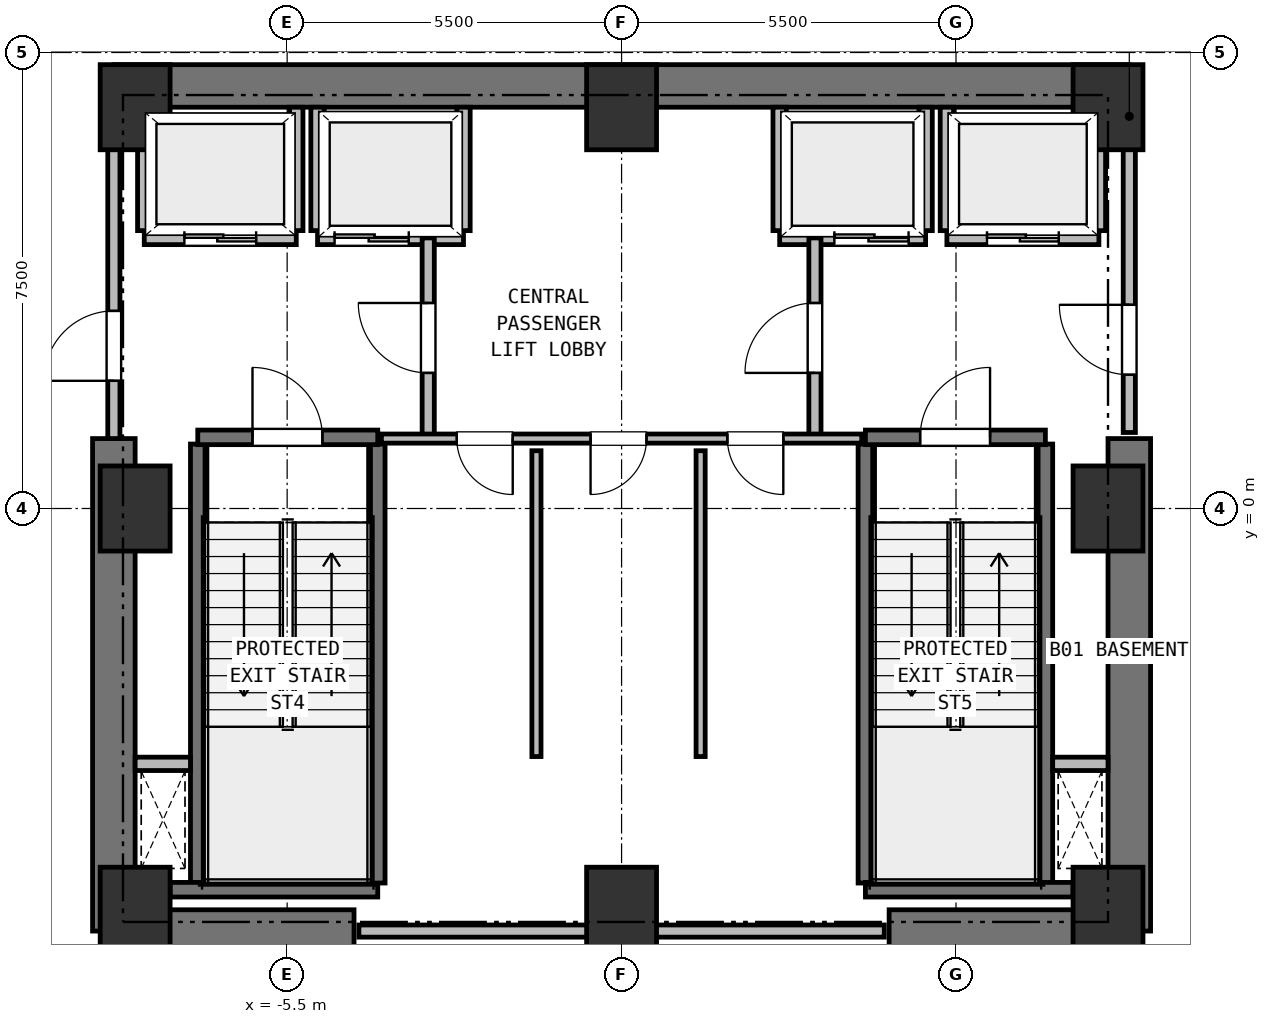
"""IFC4 building model, lengths in metres.
Left out: names, types, materials, properties, quantities, classifications, styles, units other than length and angle.
Written with IfcOpenShell. Run it as: python <this file> out.ifc"""

import sys

from ifc_helpers import new_model, si_unit, direction, frame, frame_2d, origin, origin_2d, place, context, subcontext, project, spatial, rectangle, extrude, element, fill, save


model = new_model("IFC4")
c1 = context("Model", 3, precision=1e-05, world=origin(), true_north=direction((0.0, 1.0)))
c2 = subcontext(c1, "Body", "Model", "MODEL_VIEW")
j1 = project(units=[si_unit("LENGTHUNIT", "METRE"), si_unit("PLANEANGLEUNIT", "RADIAN")], contexts=[c1])
p1 = place(None, origin())
s1 = spatial("IfcSite", under=j1, at=p1, CompositionType="ELEMENT")
p2 = place(p1, origin())
s2 = spatial("IfcBuilding", under=s1, at=p2, CompositionType="ELEMENT")
p3 = place(p2, frame((0.0, 0.0, -4.5)))
s3 = spatial("IfcBuildingStorey", under=s2, at=p3, CompositionType="ELEMENT", Elevation=-4.5)
for number, where, z_axis, x_axis in (
    (1, (-8.0, -6.6, 0.0), (0.0, 0.0, 1.0), (1.0, 0.0, 0.0)),
    (2, (0.0, -6.6, 0.0), (0.0, 0.0, 1.0), (1.0, 0.0, 0.0)),
    (3, (8.0, -6.6, 0.0), (0.0, 0.0, 1.0), (1.0, 0.0, 0.0)),
    (4, (8.0, 0.0, 0.0), (0.0, 0.0, 1.0), (1.0, 0.0, 0.0)),
    (5, (8.0, 6.6, 0.0), (0.0, 0.0, 1.0), (1.0, 0.0, 0.0)),
    (6, (0.0, 6.6, 0.0), (0.0, 0.0, 1.0), (1.0, 0.0, 0.0)),
    (7, (-8.0, 6.6, 0.0), (0.0, 0.0, 1.0), (1.0, 0.0, 0.0)),
    (8, (-8.0, 0.0, 0.0), (0.0, 0.0, 1.0), (1.0, 0.0, 0.0)),
):
    element("IfcColumn", number, at=place(p3, frame(where, z_axis=z_axis, x_axis=x_axis)), inside=s3, PredefinedType="COLUMN", context=c2, shape_type="SweptSolid", body=[
        extrude(rectangle(XDim=1.15, YDim=1.4, at=origin_2d()), origin(), (0.0, 0.0, 1.0), 4.5),
    ])
p4 = place(p3, frame((-8.35, 6.95, 0.0), z_axis=(0.0, 0.0, 1.0), x_axis=(1.0, 0.0, 0.0)))
e9 = element("IfcWall", 9, at=p4, inside=s3, PredefinedType="SHEAR", context=c2, shape_type="SweptSolid", body=[
    extrude(rectangle(XDim=16.7, YDim=0.7, at=frame_2d((8.35, 0.0))), origin(), (0.0, 0.0, 1.0), 4.22),
])
for number, where, z_axis, x_axis in (
    (10, (-8.35, -6.95, 0.0), (0.0, 0.0, 1.0), (1.0, 0.0, 0.0)),
    (11, (4.4, -6.95, 0.0), (0.0, 0.0, 1.0), (1.0, 0.0, 0.0)),
):
    element("IfcWall", number, at=place(p3, frame(where, z_axis=z_axis, x_axis=x_axis)), inside=s3, PredefinedType="SHEAR", context=c2, shape_type="SweptSolid", body=[
        extrude(rectangle(XDim=3.95, YDim=0.7, at=frame_2d((1.975, 0.0))), origin(), (0.0, 0.0, 1.0), 4.22),
    ])
for number, where, z_axis, x_axis in (
    (12, (-8.35, -6.95, 0.0), (0.0, 0.0, 1.0), (0.0, 1.0, 0.0)),
    (13, (8.35, -6.95, 0.0), (0.0, 0.0, 1.0), (0.0, 1.0, 0.0)),
):
    element("IfcWall", number, at=place(p3, frame(where, z_axis=z_axis, x_axis=x_axis)), inside=s3, PredefinedType="SHEAR", context=c2, shape_type="SweptSolid", body=[
        extrude(rectangle(XDim=8.1, YDim=0.7, at=frame_2d((4.05, 0.0))), origin(), (0.0, 0.0, 1.0), 4.22),
    ])
p5 = place(p3, frame((-6.97, -6.16, 0.0), z_axis=(0.0, 0.0, 1.0), x_axis=(0.0, 1.0, 0.0)))
e14 = element("IfcWall", 14, at=p5, inside=s3, PredefinedType="SHEAR", context=c2, shape_type="SweptSolid", body=[
    extrude(rectangle(XDim=7.22, YDim=0.24, at=frame_2d((3.61, 0.0))), origin(), (0.0, 0.0, 1.0), 4.22),
])
p6 = place(p3, frame((-7.425, -6.27, 0.0), z_axis=(0.0, 0.0, 1.0), x_axis=(1.0, 0.0, 0.0)))
e15 = element("IfcWall", 15, at=p6, inside=s3, PredefinedType="SHEAR", context=c2, shape_type="SweptSolid", body=[
    extrude(rectangle(XDim=3.415, YDim=0.24, at=frame_2d((1.708, 0.0))), origin(), (0.0, 0.0, 1.0), 4.22),
])
p7 = place(p3, frame((-4.01, -6.16, 0.0), z_axis=(0.0, 0.0, 1.0), x_axis=(0.0, 1.0, 0.0)))
e16 = element("IfcWall", 16, at=p7, inside=s3, PredefinedType="SHEAR", context=c2, shape_type="SweptSolid", body=[
    extrude(rectangle(XDim=7.22, YDim=0.24, at=frame_2d((3.61, 0.0))), origin(), (0.0, 0.0, 1.0), 4.22),
])
p8 = place(p3, frame((-6.97, 1.17, 0.0), z_axis=(0.0, 0.0, 1.0), x_axis=(1.0, 0.0, 0.0)))
e17 = element("IfcWall", 17, at=p8, inside=s3, PredefinedType="SHEAR", context=c2, shape_type="SweptSolid", body=[
    extrude(rectangle(XDim=2.96, YDim=0.24, at=frame_2d((1.48, 0.0))), origin(), (0.0, 0.0, 1.0), 4.22),
])
p9 = place(p8, frame((0.9, 0.0, 0.0)))
e18 = element("IfcOpeningElement", 18, at=p9, cuts=e17, PredefinedType="OPENING", context=c2, shape_type="SweptSolid", body=[
    extrude(rectangle(XDim=1.15, YDim=2.15, at=frame_2d((0.575, 1.075))), frame((0.0, 0.13, 0.0), z_axis=(0.0, -1.0, 0.0), x_axis=(1.0, 0.0, 0.0)), (0.0, 0.0, 1.0), 0.26),
])
for number, where, z_axis, x_axis in (
    (19, (4.01, -6.16, 0.0), (0.0, 0.0, 1.0), (0.0, 1.0, 0.0)),
    (20, (6.97, -6.16, 0.0), (0.0, 0.0, 1.0), (0.0, 1.0, 0.0)),
):
    element("IfcWall", number, at=place(p3, frame(where, z_axis=z_axis, x_axis=x_axis)), inside=s3, PredefinedType="SHEAR", context=c2, shape_type="SweptSolid", body=[
        extrude(rectangle(XDim=7.22, YDim=0.24, at=frame_2d((3.61, 0.0))), origin(), (0.0, 0.0, 1.0), 4.22),
    ])
p10 = place(p3, frame((4.01, -6.27, 0.0), z_axis=(0.0, 0.0, 1.0), x_axis=(1.0, 0.0, 0.0)))
e21 = element("IfcWall", 21, at=p10, inside=s3, PredefinedType="SHEAR", context=c2, shape_type="SweptSolid", body=[
    extrude(rectangle(XDim=3.415, YDim=0.24, at=frame_2d((1.708, 0.0))), origin(), (0.0, 0.0, 1.0), 4.22),
])
p11 = place(p3, frame((4.01, 1.17, 0.0), z_axis=(0.0, 0.0, 1.0), x_axis=(1.0, 0.0, 0.0)))
e22 = element("IfcWall", 22, at=p11, inside=s3, PredefinedType="SHEAR", context=c2, shape_type="SweptSolid", body=[
    extrude(rectangle(XDim=2.96, YDim=0.24, at=frame_2d((1.48, 0.0))), origin(), (0.0, 0.0, 1.0), 4.22),
])
p12 = place(p11, frame((0.9, 0.0, 0.0)))
e23 = element("IfcOpeningElement", 23, at=p12, cuts=e22, PredefinedType="OPENING", context=c2, shape_type="SweptSolid", body=[
    extrude(rectangle(XDim=1.15, YDim=2.15, at=frame_2d((0.575, 1.075))), frame((0.0, 0.13, 0.0), z_axis=(0.0, -1.0, 0.0), x_axis=(1.0, 0.0, 0.0)), (0.0, 0.0, 1.0), 0.26),
])
for number, where, z_axis, x_axis in (
    (24, (-8.0, -4.2, 0.0), (0.0, 0.0, 1.0), (1.0, 0.0, 0.0)),
    (25, (7.09, -4.2, 0.0), (0.0, 0.0, 1.0), (1.0, 0.0, 0.0)),
):
    element("IfcWall", number, at=place(p3, frame(where, z_axis=z_axis, x_axis=x_axis)), inside=s3, PredefinedType="PARTITIONING", context=c2, shape_type="SweptSolid", body=[
        extrude(rectangle(XDim=0.91, YDim=0.22, at=frame_2d((0.455, 0.0))), origin(), (0.0, 0.0, 1.0), 4.22),
    ])
p13 = place(p3, frame((-7.85, 4.45, 0.0), z_axis=(0.0, 0.0, 1.0), x_axis=(1.0, 0.0, 0.0)))
e26 = element("IfcWall", 26, at=p13, inside=s3, PredefinedType="PARTITIONING", context=c2, shape_type="SweptSolid", body=[
    extrude(rectangle(XDim=2.5, YDim=0.22, at=frame_2d((1.25, 0.0))), origin(), (0.0, 0.0, 1.0), 4.22),
])
p14 = place(p13, frame((0.66, 0.0, 0.0)))
e27 = element("IfcOpeningElement", 27, at=p14, cuts=e26, PredefinedType="OPENING", context=c2, shape_type="SweptSolid", body=[
    extrude(rectangle(XDim=1.18, YDim=2.15, at=frame_2d((0.59, 1.075))), frame((0.0, 0.12, 0.0), z_axis=(0.0, -1.0, 0.0), x_axis=(1.0, 0.0, 0.0)), (0.0, 0.0, 1.0), 0.24),
])
p15 = place(p3, frame((-7.85, 4.57, 0.0), z_axis=(0.0, 0.0, 1.0), x_axis=(0.0, 1.0, 0.0)))
e28 = element("IfcWall", 28, at=p15, inside=s3, PredefinedType="PARTITIONING", context=c2, shape_type="SweptSolid", body=[
    extrude(rectangle(XDim=2.03, YDim=0.22, at=frame_2d((1.015, 0.0))), origin(), (0.0, 0.0, 1.0), 3.8),
])
p16 = place(p3, frame((-5.35, 4.57, 0.0), z_axis=(0.0, 0.0, 1.0), x_axis=(0.0, 1.0, 0.0)))
e29 = element("IfcWall", 29, at=p16, inside=s3, PredefinedType="PARTITIONING", context=c2, shape_type="SweptSolid", body=[
    extrude(rectangle(XDim=2.03, YDim=0.22, at=frame_2d((1.015, 0.0))), origin(), (0.0, 0.0, 1.0), 4.22),
])
p17 = place(p3, frame((5.35, 4.45, 0.0), z_axis=(0.0, 0.0, 1.0), x_axis=(1.0, 0.0, 0.0)))
e30 = element("IfcWall", 30, at=p17, inside=s3, PredefinedType="PARTITIONING", context=c2, shape_type="SweptSolid", body=[
    extrude(rectangle(XDim=2.5, YDim=0.22, at=frame_2d((1.25, 0.0))), origin(), (0.0, 0.0, 1.0), 4.22),
])
p18 = place(p17, frame((0.66, 0.0, 0.0)))
e31 = element("IfcOpeningElement", 31, at=p18, cuts=e30, PredefinedType="OPENING", context=c2, shape_type="SweptSolid", body=[
    extrude(rectangle(XDim=1.18, YDim=2.15, at=frame_2d((0.59, 1.075))), frame((0.0, 0.12, 0.0), z_axis=(0.0, -1.0, 0.0), x_axis=(1.0, 0.0, 0.0)), (0.0, 0.0, 1.0), 0.24),
])
p19 = place(p3, frame((5.35, 4.57, 0.0), z_axis=(0.0, 0.0, 1.0), x_axis=(0.0, 1.0, 0.0)))
e32 = element("IfcWall", 32, at=p19, inside=s3, PredefinedType="PARTITIONING", context=c2, shape_type="SweptSolid", body=[
    extrude(rectangle(XDim=2.03, YDim=0.22, at=frame_2d((1.015, 0.0))), origin(), (0.0, 0.0, 1.0), 4.22),
])
p20 = place(p3, frame((7.85, 4.57, 0.0), z_axis=(0.0, 0.0, 1.0), x_axis=(0.0, 1.0, 0.0)))
e33 = element("IfcWall", 33, at=p20, inside=s3, PredefinedType="PARTITIONING", context=c2, shape_type="SweptSolid", body=[
    extrude(rectangle(XDim=2.03, YDim=0.22, at=frame_2d((1.015, 0.0))), origin(), (0.0, 0.0, 1.0), 3.8),
])
p21 = place(p3, frame((-5.0, 4.45, 0.0), z_axis=(0.0, 0.0, 1.0), x_axis=(1.0, 0.0, 0.0)))
e34 = element("IfcWall", 34, at=p21, inside=s3, PredefinedType="PARTITIONING", context=c2, shape_type="SweptSolid", body=[
    extrude(rectangle(XDim=2.4, YDim=0.22, at=frame_2d((1.2, 0.0))), origin(), (0.0, 0.0, 1.0), 4.22),
])
p22 = place(p21, frame((0.28, 0.0, 0.0)))
e35 = element("IfcOpeningElement", 35, at=p22, cuts=e34, PredefinedType="OPENING", context=c2, shape_type="SweptSolid", body=[
    extrude(rectangle(XDim=1.22, YDim=2.15, at=frame_2d((0.61, 1.075))), frame((0.0, 0.12, 0.0), z_axis=(0.0, -1.0, 0.0), x_axis=(1.0, 0.0, 0.0)), (0.0, 0.0, 1.0), 0.24),
])
for number, where, z_axis, x_axis in (
    (36, (-5.0, 4.57, 0.0), (0.0, 0.0, 1.0), (0.0, 1.0, 0.0)),
    (37, (-2.6, 4.57, 0.0), (0.0, 0.0, 1.0), (0.0, 1.0, 0.0)),
):
    element("IfcWall", number, at=place(p3, frame(where, z_axis=z_axis, x_axis=x_axis)), inside=s3, PredefinedType="PARTITIONING", context=c2, shape_type="SweptSolid", body=[
        extrude(rectangle(XDim=2.03, YDim=0.22, at=frame_2d((1.015, 0.0))), origin(), (0.0, 0.0, 1.0), 4.22),
    ])
p23 = place(p3, frame((2.6, 4.45, 0.0), z_axis=(0.0, 0.0, 1.0), x_axis=(1.0, 0.0, 0.0)))
e38 = element("IfcWall", 38, at=p23, inside=s3, PredefinedType="PARTITIONING", context=c2, shape_type="SweptSolid", body=[
    extrude(rectangle(XDim=2.4, YDim=0.22, at=frame_2d((1.2, 0.0))), origin(), (0.0, 0.0, 1.0), 4.22),
])
p24 = place(p23, frame((0.9, 0.0, 0.0)))
e39 = element("IfcOpeningElement", 39, at=p24, cuts=e38, PredefinedType="OPENING", context=c2, shape_type="SweptSolid", body=[
    extrude(rectangle(XDim=1.22, YDim=2.15, at=frame_2d((0.61, 1.075))), frame((0.0, 0.12, 0.0), z_axis=(0.0, -1.0, 0.0), x_axis=(1.0, 0.0, 0.0)), (0.0, 0.0, 1.0), 0.24),
])
for number, where, z_axis, x_axis in (
    (40, (2.6, 4.57, 0.0), (0.0, 0.0, 1.0), (0.0, 1.0, 0.0)),
    (41, (5.0, 4.57, 0.0), (0.0, 0.0, 1.0), (0.0, 1.0, 0.0)),
):
    element("IfcWall", number, at=place(p3, frame(where, z_axis=z_axis, x_axis=x_axis)), inside=s3, PredefinedType="PARTITIONING", context=c2, shape_type="SweptSolid", body=[
        extrude(rectangle(XDim=2.03, YDim=0.22, at=frame_2d((1.015, 0.0))), origin(), (0.0, 0.0, 1.0), 4.22),
    ])
p25 = place(p3, frame((-3.18, 1.15, 0.0), z_axis=(0.0, 0.0, 1.0), x_axis=(0.0, 1.0, 0.0)))
e42 = element("IfcWall", 42, at=p25, inside=s3, PredefinedType="PARTITIONING", context=c2, shape_type="SweptSolid", body=[
    extrude(rectangle(XDim=3.3, YDim=0.2, at=frame_2d((1.65, 0.0))), origin(), (0.0, 0.0, 1.0), 4.22),
])
p26 = place(p25, frame((1.08, 0.0, 0.0)))
e43 = element("IfcOpeningElement", 43, at=p26, cuts=e42, PredefinedType="OPENING", context=c2, shape_type="SweptSolid", body=[
    extrude(rectangle(XDim=1.15, YDim=2.15, at=frame_2d((0.575, 1.075))), frame((0.0, 0.11, 0.0), z_axis=(0.0, -1.0, 0.0), x_axis=(1.0, 0.0, 0.0)), (0.0, 0.0, 1.0), 0.22),
])
p27 = place(p3, frame((3.18, 1.15, 0.0), z_axis=(0.0, 0.0, 1.0), x_axis=(0.0, 1.0, 0.0)))
e44 = element("IfcWall", 44, at=p27, inside=s3, PredefinedType="PARTITIONING", context=c2, shape_type="SweptSolid", body=[
    extrude(rectangle(XDim=3.3, YDim=0.2, at=frame_2d((1.65, 0.0))), origin(), (0.0, 0.0, 1.0), 4.22),
])
p28 = place(p27, frame((1.08, 0.0, 0.0)))
e45 = element("IfcOpeningElement", 45, at=p28, cuts=e44, PredefinedType="OPENING", context=c2, shape_type="SweptSolid", body=[
    extrude(rectangle(XDim=1.15, YDim=2.15, at=frame_2d((0.575, 1.075))), frame((0.0, 0.11, 0.0), z_axis=(0.0, -1.0, 0.0), x_axis=(1.0, 0.0, 0.0)), (0.0, 0.0, 1.0), 0.22),
])
p29 = place(p3, frame((-8.35, 1.15, 0.0), z_axis=(0.0, 0.0, 1.0), x_axis=(0.0, 1.0, 0.0)))
e46 = element("IfcWall", 46, at=p29, inside=s3, PredefinedType="PARTITIONING", context=c2, shape_type="SweptSolid", body=[
    extrude(rectangle(XDim=5.4, YDim=0.2, at=frame_2d((2.7, 0.0))), origin(), (0.0, 0.0, 1.0), 4.22),
])
p30 = place(p29, frame((0.95, 0.0, 0.0)))
e47 = element("IfcOpeningElement", 47, at=p30, cuts=e46, PredefinedType="OPENING", context=c2, shape_type="SweptSolid", body=[
    extrude(rectangle(XDim=1.15, YDim=2.15, at=frame_2d((0.575, 1.075))), frame((0.0, 0.11, 0.0), z_axis=(0.0, -1.0, 0.0), x_axis=(1.0, 0.0, 0.0)), (0.0, 0.0, 1.0), 0.22),
])
p31 = place(p3, frame((8.35, 1.25, 0.0), z_axis=(0.0, 0.0, 1.0), x_axis=(0.0, 1.0, 0.0)))
e48 = element("IfcWall", 48, at=p31, inside=s3, PredefinedType="PARTITIONING", context=c2, shape_type="SweptSolid", body=[
    extrude(rectangle(XDim=5.3, YDim=0.2, at=frame_2d((2.65, 0.0))), origin(), (0.0, 0.0, 1.0), 4.22),
])
p32 = place(p31, frame((0.95, 0.0, 0.0)))
e49 = element("IfcOpeningElement", 49, at=p32, cuts=e48, PredefinedType="OPENING", context=c2, shape_type="SweptSolid", body=[
    extrude(rectangle(XDim=1.15, YDim=2.15, at=frame_2d((0.575, 1.075))), frame((0.0, 0.11, 0.0), z_axis=(0.0, -1.0, 0.0), x_axis=(1.0, 0.0, 0.0)), (0.0, 0.0, 1.0), 0.22),
])
p33 = place(p3, frame((3.95, 1.15, 0.0), z_axis=(0.0, 0.0, 1.0), x_axis=(-1.0, 0.0, 0.0)))
e50 = element("IfcWall", 50, at=p33, inside=s3, PredefinedType="PARTITIONING", context=c2, shape_type="SweptSolid", body=[
    extrude(rectangle(XDim=7.9, YDim=0.15, at=frame_2d((3.95, 0.0))), origin(), (0.0, 0.0, 1.0), 4.22),
])
p34 = place(p33, frame((5.74, 0.0, 0.0)))
e51 = element("IfcOpeningElement", 51, at=p34, cuts=e50, PredefinedType="OPENING", context=c2, shape_type="SweptSolid", body=[
    extrude(rectangle(XDim=0.92, YDim=2.05, at=frame_2d((0.46, 1.025))), frame((0.0, 0.085, 0.0), z_axis=(0.0, -1.0, 0.0), x_axis=(1.0, 0.0, 0.0)), (0.0, 0.0, 1.0), 0.17),
])
p35 = place(p33, frame((3.54, 0.0, 0.0)))
e52 = element("IfcOpeningElement", 52, at=p35, cuts=e50, PredefinedType="OPENING", context=c2, shape_type="SweptSolid", body=[
    extrude(rectangle(XDim=0.92, YDim=2.05, at=frame_2d((0.46, 1.025))), frame((0.0, 0.085, 0.0), z_axis=(0.0, -1.0, 0.0), x_axis=(1.0, 0.0, 0.0)), (0.0, 0.0, 1.0), 0.17),
])
p36 = place(p33, frame((1.29, 0.0, 0.0)))
e53 = element("IfcOpeningElement", 53, at=p36, cuts=e50, PredefinedType="OPENING", context=c2, shape_type="SweptSolid", body=[
    extrude(rectangle(XDim=0.92, YDim=2.05, at=frame_2d((0.46, 1.025))), frame((0.0, 0.085, 0.0), z_axis=(0.0, -1.0, 0.0), x_axis=(1.0, 0.0, 0.0)), (0.0, 0.0, 1.0), 0.17),
])
p37 = place(p3, frame((-4.32, -6.95, 0.0), z_axis=(0.0, 0.0, 1.0), x_axis=(1.0, 0.0, 0.0)))
e54 = element("IfcWall", 54, at=p37, inside=s3, PredefinedType="PARTITIONING", context=c2, shape_type="SweptSolid", body=[
    extrude(rectangle(XDim=8.64, YDim=0.2, at=frame_2d((4.32, 0.0))), origin(), (0.0, 0.0, 1.0), 4.22),
])
for number, where, z_axis, x_axis in (
    (55, (-1.4, -4.08, 0.0), (0.0, 0.0, 1.0), (0.0, 1.0, 0.0)),
    (56, (1.3, -4.08, 0.0), (0.0, 0.0, 1.0), (0.0, 1.0, 0.0)),
):
    element("IfcWall", number, at=place(p3, frame(where, z_axis=z_axis, x_axis=x_axis)), inside=s3, PredefinedType="PARTITIONING", context=c2, shape_type="SweptSolid", body=[
        extrude(rectangle(XDim=5.03, YDim=0.15, at=frame_2d((2.515, 0.0))), origin(), (0.0, 0.0, 1.0), 4.22),
    ])
p38 = place(p9, origin())
e57 = element("IfcDoor", 57, at=p38, inside=s3, OperationType="SINGLE_SWING_LEFT", PredefinedType="DOOR", context=c2, shape_type="SweptSolid", body=[
    extrude(rectangle(XDim=1.15, YDim=2.15, at=frame_2d((0.575, 1.075))), frame((0.0, 0.025, 0.0), z_axis=(0.0, -1.0, 0.0), x_axis=(1.0, 0.0, 0.0)), (0.0, 0.0, 1.0), 0.05),
])
fill(e18, e57)
p39 = place(p12, origin())
e58 = element("IfcDoor", 58, at=p39, inside=s3, OperationType="SINGLE_SWING_RIGHT", PredefinedType="DOOR", context=c2, shape_type="SweptSolid", body=[
    extrude(rectangle(XDim=1.15, YDim=2.15, at=frame_2d((0.575, 1.075))), frame((0.0, 0.025, 0.0), z_axis=(0.0, -1.0, 0.0), x_axis=(1.0, 0.0, 0.0)), (0.0, 0.0, 1.0), 0.05),
])
fill(e23, e58)
p40 = place(p14, origin())
e59 = element("IfcDoor", 59, at=p40, inside=s3, OperationType="DOUBLE_DOOR_SLIDING", PredefinedType="DOOR", context=c2, shape_type="SweptSolid", body=[
    extrude(rectangle(XDim=1.18, YDim=2.15, at=frame_2d((0.59, 1.075))), frame((0.0, 0.025, 0.0), z_axis=(0.0, -1.0, 0.0), x_axis=(1.0, 0.0, 0.0)), (0.0, 0.0, 1.0), 0.05),
])
fill(e27, e59)
p41 = place(p18, origin())
e60 = element("IfcDoor", 60, at=p41, inside=s3, OperationType="DOUBLE_DOOR_SLIDING", PredefinedType="DOOR", context=c2, shape_type="SweptSolid", body=[
    extrude(rectangle(XDim=1.18, YDim=2.15, at=frame_2d((0.59, 1.075))), frame((0.0, 0.025, 0.0), z_axis=(0.0, -1.0, 0.0), x_axis=(1.0, 0.0, 0.0)), (0.0, 0.0, 1.0), 0.05),
])
fill(e31, e60)
p42 = place(p22, origin())
e61 = element("IfcDoor", 61, at=p42, inside=s3, OperationType="DOUBLE_DOOR_SLIDING", PredefinedType="DOOR", context=c2, shape_type="SweptSolid", body=[
    extrude(rectangle(XDim=1.22, YDim=2.15, at=frame_2d((0.61, 1.075))), frame((0.0, 0.025, 0.0), z_axis=(0.0, -1.0, 0.0), x_axis=(1.0, 0.0, 0.0)), (0.0, 0.0, 1.0), 0.05),
])
fill(e35, e61)
p43 = place(p24, origin())
e62 = element("IfcDoor", 62, at=p43, inside=s3, OperationType="DOUBLE_DOOR_SLIDING", PredefinedType="DOOR", context=c2, shape_type="SweptSolid", body=[
    extrude(rectangle(XDim=1.22, YDim=2.15, at=frame_2d((0.61, 1.075))), frame((0.0, 0.025, 0.0), z_axis=(0.0, -1.0, 0.0), x_axis=(1.0, 0.0, 0.0)), (0.0, 0.0, 1.0), 0.05),
])
fill(e39, e62)
p44 = place(p26, origin())
e63 = element("IfcDoor", 63, at=p44, inside=s3, OperationType="SINGLE_SWING_RIGHT", PredefinedType="DOOR", context=c2, shape_type="SweptSolid", body=[
    extrude(rectangle(XDim=1.15, YDim=2.15, at=frame_2d((0.575, 1.075))), frame((0.0, 0.025, 0.0), z_axis=(0.0, -1.0, 0.0), x_axis=(1.0, 0.0, 0.0)), (0.0, 0.0, 1.0), 0.05),
])
fill(e43, e63)
p45 = place(p28, origin())
e64 = element("IfcDoor", 64, at=p45, inside=s3, OperationType="SINGLE_SWING_LEFT", PredefinedType="DOOR", context=c2, shape_type="SweptSolid", body=[
    extrude(rectangle(XDim=1.15, YDim=2.15, at=frame_2d((0.575, 1.075))), frame((0.0, 0.025, 0.0), z_axis=(0.0, -1.0, 0.0), x_axis=(1.0, 0.0, 0.0)), (0.0, 0.0, 1.0), 0.05),
])
fill(e45, e64)
p46 = place(p30, origin())
e65 = element("IfcDoor", 65, at=p46, inside=s3, OperationType="SINGLE_SWING_LEFT", PredefinedType="DOOR", context=c2, shape_type="SweptSolid", body=[
    extrude(rectangle(XDim=1.15, YDim=2.15, at=frame_2d((0.575, 1.075))), frame((0.0, 0.025, 0.0), z_axis=(0.0, -1.0, 0.0), x_axis=(1.0, 0.0, 0.0)), (0.0, 0.0, 1.0), 0.05),
])
fill(e47, e65)
p47 = place(p32, origin())
e66 = element("IfcDoor", 66, at=p47, inside=s3, OperationType="SINGLE_SWING_RIGHT", PredefinedType="DOOR", context=c2, shape_type="SweptSolid", body=[
    extrude(rectangle(XDim=1.15, YDim=2.15, at=frame_2d((0.575, 1.075))), frame((0.0, 0.025, 0.0), z_axis=(0.0, -1.0, 0.0), x_axis=(1.0, 0.0, 0.0)), (0.0, 0.0, 1.0), 0.05),
])
fill(e49, e66)
p48 = place(p34, origin())
e67 = element("IfcDoor", 67, at=p48, inside=s3, OperationType="SINGLE_SWING_LEFT", PredefinedType="DOOR", context=c2, shape_type="SweptSolid", body=[
    extrude(rectangle(XDim=0.92, YDim=2.05, at=frame_2d((0.46, 1.025))), frame((0.0, 0.025, 0.0), z_axis=(0.0, -1.0, 0.0), x_axis=(1.0, 0.0, 0.0)), (0.0, 0.0, 1.0), 0.05),
])
fill(e51, e67)
p49 = place(p35, origin())
e68 = element("IfcDoor", 68, at=p49, inside=s3, OperationType="SINGLE_SWING_RIGHT", PredefinedType="DOOR", context=c2, shape_type="SweptSolid", body=[
    extrude(rectangle(XDim=0.92, YDim=2.05, at=frame_2d((0.46, 1.025))), frame((0.0, 0.025, 0.0), z_axis=(0.0, -1.0, 0.0), x_axis=(1.0, 0.0, 0.0)), (0.0, 0.0, 1.0), 0.05),
])
fill(e52, e68)
p50 = place(p36, origin())
e69 = element("IfcDoor", 69, at=p50, inside=s3, OperationType="SINGLE_SWING_LEFT", PredefinedType="DOOR", context=c2, shape_type="SweptSolid", body=[
    extrude(rectangle(XDim=0.92, YDim=2.05, at=frame_2d((0.46, 1.025))), frame((0.0, 0.025, 0.0), z_axis=(0.0, -1.0, 0.0), x_axis=(1.0, 0.0, 0.0)), (0.0, 0.0, 1.0), 0.05),
])
fill(e53, e69)
save(model, sys.argv[1])
